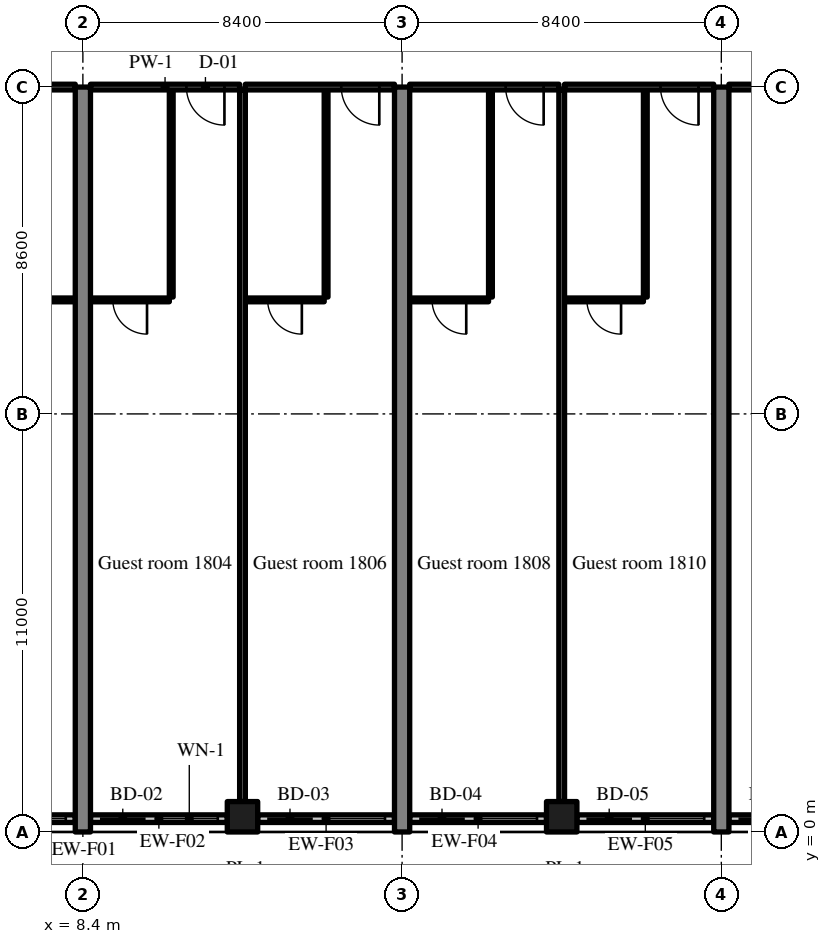
"""IFC4 building model, lengths in metres.
Left out: names, types, materials, properties, quantities, classifications, styles, units other than length and angle.
Written with IfcOpenShell. Run it as: python <this file> out.ifc"""

import sys

from ifc_helpers import new_model, si_unit, direction, frame, frame_2d, origin, origin_2d, place, context, subcontext, project, spatial, rectangle, extrude, source, transform, mapped, element, fill, save


model = new_model("IFC4")
c1 = context("Model", 3, precision=1e-05, world=origin(), true_north=direction((0.0, 1.0)))
c2 = subcontext(c1, "Body", "Model", "MODEL_VIEW")
j1 = project(units=[si_unit("LENGTHUNIT", "METRE"), si_unit("PLANEANGLEUNIT", "RADIAN")], contexts=[c1])
p1 = place(None, origin())
s1 = spatial("IfcSite", under=j1, at=p1, CompositionType="ELEMENT")
p2 = place(p1, origin())
s2 = spatial("IfcBuilding", under=s1, at=p2, CompositionType="ELEMENT")
p3 = place(p2, frame((0.0, 0.0, 77.2)))
s3 = spatial("IfcBuildingStorey", under=s2, at=p3, CompositionType="ELEMENT", Elevation=77.2)
m1 = source(origin(), c2, "Body", "SweptSolid", [
    extrude(rectangle(XDim=19.6, YDim=0.4, at=frame_2d((9.8, 0.0))), origin(), (0.0, 0.0, 1.0), 3.52),
])
for number, where, z_axis, x_axis in (
    (1, (8.4, 0.0, 0.0), (0.0, 0.0, 1.0), (0.0, 1.0, 0.0)),
    (2, (16.8, 0.0, 0.0), (0.0, 0.0, 1.0), (0.0, 1.0, 0.0)),
    (3, (25.2, 0.0, 0.0), (0.0, 0.0, 1.0), (0.0, 1.0, 0.0)),
):
    element("IfcWall", number, at=place(p3, frame(where, z_axis=z_axis, x_axis=x_axis)), inside=s3, PredefinedType="SHEAR", context=c2, shape_type="MappedRepresentation", body=[
        mapped(m1, transform((0.0, 0.0, 0.0), scale=1.0)),
    ])
m2 = source(origin(), c2, "Body", "SweptSolid", [
    extrude(rectangle(XDim=0.8, YDim=0.8, at=origin_2d()), origin(), (0.0, 0.0, 1.0), 3.52),
])
for number, where, z_axis, x_axis in (
    (4, (12.6, 0.4, 0.0), (0.0, 0.0, 1.0), (1.0, 0.0, 0.0)),
    (5, (21.0, 0.4, 0.0), (0.0, 0.0, 1.0), (1.0, 0.0, 0.0)),
):
    element("IfcColumn", number, at=place(p3, frame(where, z_axis=z_axis, x_axis=x_axis)), inside=s3, PredefinedType="COLUMN", context=c2, shape_type="MappedRepresentation", body=[
        mapped(m2, transform((0.0, 0.0, 0.0), scale=1.0)),
    ])
m3 = source(origin(), c2, "Body", "SweptSolid", [
    extrude(rectangle(XDim=4.055, YDim=0.2, at=frame_2d((2.027, 0.0))), origin(), (0.0, 0.0, 1.0), 2.82),
])
p4 = place(p3, frame((4.145, 0.35, 0.0), z_axis=(0.0, 0.0, 1.0), x_axis=(1.0, 0.0, 0.0)))
e6 = element("IfcWall", 6, at=p4, inside=s3, PredefinedType="SOLIDWALL", context=c2, shape_type="MappedRepresentation", body=[
    mapped(m3, transform((0.0, 0.0, 0.0), scale=1.0)),
])
m4 = source(origin(), c2, "Body", "SweptSolid", [
    extrude(rectangle(XDim=1.2, YDim=2.4, at=frame_2d((0.6, 1.2))), frame((0.0, 0.11, 0.0), z_axis=(0.0, -1.0, 0.0), x_axis=(1.0, 0.0, 0.0)), (0.0, 0.0, 1.0), 0.22),
])
p5 = place(p4, frame((0.25, 0.0, 0.0)))
e7 = element("IfcOpeningElement", 7, at=p5, cuts=e6, PredefinedType="OPENING", context=c2, shape_type="MappedRepresentation", body=[
    mapped(m4, transform((0.0, 0.0, 0.0), scale=1.0)),
])
m5 = source(origin(), c2, "Body", "SweptSolid", [
    extrude(rectangle(XDim=1.5, YDim=1.5, at=frame_2d((0.75, 0.75))), frame((0.0, 0.11, 0.0), z_axis=(0.0, -1.0, 0.0), x_axis=(1.0, 0.0, 0.0)), (0.0, 0.0, 1.0), 0.22),
])
p6 = place(p4, frame((2.305, 0.0, 0.9)))
e8 = element("IfcOpeningElement", 8, at=p6, cuts=e6, PredefinedType="OPENING", context=c2, shape_type="MappedRepresentation", body=[
    mapped(m5, transform((0.0, 0.0, 0.0), scale=1.0)),
])
m6 = source(origin(), c2, "Body", "SweptSolid", [
    extrude(rectangle(XDim=3.6, YDim=0.2, at=frame_2d((1.8, 0.0))), origin(), (0.0, 0.0, 1.0), 2.82),
])
p7 = place(p3, frame((8.6, 0.35, 0.0), z_axis=(0.0, 0.0, 1.0), x_axis=(1.0, 0.0, 0.0)))
e9 = element("IfcWall", 9, at=p7, inside=s3, PredefinedType="SOLIDWALL", context=c2, shape_type="MappedRepresentation", body=[
    mapped(m6, transform((0.0, 0.0, 0.0), scale=1.0)),
])
p8 = place(p7, frame((0.25, 0.0, 0.0)))
e10 = element("IfcOpeningElement", 10, at=p8, cuts=e9, PredefinedType="OPENING", context=c2, shape_type="MappedRepresentation", body=[
    mapped(m4, transform((0.0, 0.0, 0.0), scale=1.0)),
])
p9 = place(p7, frame((1.85, 0.0, 0.9)))
e11 = element("IfcOpeningElement", 11, at=p9, cuts=e9, PredefinedType="OPENING", context=c2, shape_type="MappedRepresentation", body=[
    mapped(m5, transform((0.0, 0.0, 0.0), scale=1.0)),
])
m7 = source(origin(), c2, "Body", "SweptSolid", [
    extrude(rectangle(XDim=3.6, YDim=0.2, at=frame_2d((1.8, 0.0))), origin(), (0.0, 0.0, 1.0), 2.82),
])
p10 = place(p3, frame((13.0, 0.35, 0.0), z_axis=(0.0, 0.0, 1.0), x_axis=(1.0, 0.0, 0.0)))
e12 = element("IfcWall", 12, at=p10, inside=s3, PredefinedType="SOLIDWALL", context=c2, shape_type="MappedRepresentation", body=[
    mapped(m7, transform((0.0, 0.0, 0.0), scale=1.0)),
])
p11 = place(p10, frame((0.25, 0.0, 0.0)))
e13 = element("IfcOpeningElement", 13, at=p11, cuts=e12, PredefinedType="OPENING", context=c2, shape_type="MappedRepresentation", body=[
    mapped(m4, transform((0.0, 0.0, 0.0), scale=1.0)),
])
p12 = place(p10, frame((1.85, 0.0, 0.9)))
e14 = element("IfcOpeningElement", 14, at=p12, cuts=e12, PredefinedType="OPENING", context=c2, shape_type="MappedRepresentation", body=[
    mapped(m5, transform((0.0, 0.0, 0.0), scale=1.0)),
])
p13 = place(p3, frame((17.0, 0.35, 0.0), z_axis=(0.0, 0.0, 1.0), x_axis=(1.0, 0.0, 0.0)))
e15 = element("IfcWall", 15, at=p13, inside=s3, PredefinedType="SOLIDWALL", context=c2, shape_type="MappedRepresentation", body=[
    mapped(m7, transform((0.0, 0.0, 0.0), scale=1.0)),
])
p14 = place(p13, frame((0.25, 0.0, 0.0)))
e16 = element("IfcOpeningElement", 16, at=p14, cuts=e15, PredefinedType="OPENING", context=c2, shape_type="MappedRepresentation", body=[
    mapped(m4, transform((0.0, 0.0, 0.0), scale=1.0)),
])
p15 = place(p13, frame((1.85, 0.0, 0.9)))
e17 = element("IfcOpeningElement", 17, at=p15, cuts=e15, PredefinedType="OPENING", context=c2, shape_type="MappedRepresentation", body=[
    mapped(m5, transform((0.0, 0.0, 0.0), scale=1.0)),
])
p16 = place(p3, frame((21.4, 0.35, 0.0), z_axis=(0.0, 0.0, 1.0), x_axis=(1.0, 0.0, 0.0)))
e18 = element("IfcWall", 18, at=p16, inside=s3, PredefinedType="SOLIDWALL", context=c2, shape_type="MappedRepresentation", body=[
    mapped(m7, transform((0.0, 0.0, 0.0), scale=1.0)),
])
p17 = place(p16, frame((0.25, 0.0, 0.0)))
e19 = element("IfcOpeningElement", 19, at=p17, cuts=e18, PredefinedType="OPENING", context=c2, shape_type="MappedRepresentation", body=[
    mapped(m4, transform((0.0, 0.0, 0.0), scale=1.0)),
])
p18 = place(p16, frame((1.85, 0.0, 0.9)))
e20 = element("IfcOpeningElement", 20, at=p18, cuts=e18, PredefinedType="OPENING", context=c2, shape_type="MappedRepresentation", body=[
    mapped(m5, transform((0.0, 0.0, 0.0), scale=1.0)),
])
p19 = place(p3, frame((25.4, 0.35, 0.0), z_axis=(0.0, 0.0, 1.0), x_axis=(1.0, 0.0, 0.0)))
e21 = element("IfcWall", 21, at=p19, inside=s3, PredefinedType="SOLIDWALL", context=c2, shape_type="MappedRepresentation", body=[
    mapped(m7, transform((0.0, 0.0, 0.0), scale=1.0)),
])
p20 = place(p19, frame((0.25, 0.0, 0.0)))
e22 = element("IfcOpeningElement", 22, at=p20, cuts=e21, PredefinedType="OPENING", context=c2, shape_type="MappedRepresentation", body=[
    mapped(m4, transform((0.0, 0.0, 0.0), scale=1.0)),
])
p21 = place(p19, frame((1.85, 0.0, 0.9)))
e23 = element("IfcOpeningElement", 23, at=p21, cuts=e21, PredefinedType="OPENING", context=c2, shape_type="MappedRepresentation", body=[
    mapped(m5, transform((0.0, 0.0, 0.0), scale=1.0)),
])
m8 = source(origin(), c2, "Body", "SweptSolid", [
    extrude(rectangle(XDim=2.35, YDim=0.1, at=frame_2d((1.175, 0.0))), origin(), (0.0, 0.0, 1.0), 3.52),
])
p22 = place(p3, frame((5.85, 14.0, 0.0), z_axis=(0.0, 0.0, 1.0), x_axis=(1.0, 0.0, 0.0)))
e24 = element("IfcWall", 24, at=p22, inside=s3, PredefinedType="PARTITIONING", context=c2, shape_type="MappedRepresentation", body=[
    mapped(m8, transform((0.0, 0.0, 0.0), scale=1.0)),
])
m9 = source(origin(), c2, "Body", "SweptSolid", [
    extrude(rectangle(XDim=0.9, YDim=2.1, at=frame_2d((0.45, 1.05))), frame((0.0, 0.06, 0.0), z_axis=(0.0, -1.0, 0.0), x_axis=(1.0, 0.0, 0.0)), (0.0, 0.0, 1.0), 0.12),
])
p23 = place(p22, frame((0.725, 0.0, 0.0)))
e25 = element("IfcOpeningElement", 25, at=p23, cuts=e24, PredefinedType="OPENING", context=c2, shape_type="MappedRepresentation", body=[
    mapped(m9, transform((0.0, 0.0, 0.0), scale=1.0)),
])
m10 = source(origin(), c2, "Body", "SweptSolid", [
    extrude(rectangle(XDim=7.8, YDim=0.15, at=frame_2d((3.9, 0.0))), origin(), (0.0, 0.0, 1.0), 2.82),
])
p24 = place(p3, frame((0.4, 19.6, 0.0), z_axis=(0.0, 0.0, 1.0), x_axis=(1.0, 0.0, 0.0)))
e26 = element("IfcWall", 26, at=p24, inside=s3, PredefinedType="PARTITIONING", context=c2, shape_type="MappedRepresentation", body=[
    mapped(m10, transform((0.0, 0.0, 0.0), scale=1.0)),
])
m11 = source(origin(), c2, "Body", "SweptSolid", [
    extrude(rectangle(XDim=1.0, YDim=2.1, at=frame_2d((0.5, 1.05))), frame((0.0, 0.085, 0.0), z_axis=(0.0, -1.0, 0.0), x_axis=(1.0, 0.0, 0.0)), (0.0, 0.0, 1.0), 0.17),
])
p25 = place(p24, frame((0.4, 0.0, 0.0)))
e27 = element("IfcOpeningElement", 27, at=p25, cuts=e26, PredefinedType="OPENING", context=c2, shape_type="MappedRepresentation", body=[
    mapped(m11, transform((0.0, 0.0, 0.0), scale=1.0)),
])
m12 = source(origin(), c2, "Body", "SweptSolid", [
    extrude(rectangle(XDim=5.45, YDim=0.1, at=frame_2d((2.725, 0.0))), origin(), (0.0, 0.0, 1.0), 3.52),
])
p26 = place(p3, frame((10.725, 14.075, 0.0), z_axis=(0.0, 0.0, 1.0), x_axis=(0.0, 1.0, 0.0)))
e28 = element("IfcWall", 28, at=p26, inside=s3, PredefinedType="PARTITIONING", context=c2, shape_type="MappedRepresentation", body=[
    mapped(m12, transform((0.0, 0.0, 0.0), scale=1.0)),
])
m13 = source(origin(), c2, "Body", "SweptSolid", [
    extrude(rectangle(XDim=2.075, YDim=0.1, at=frame_2d((1.038, 0.0))), origin(), (0.0, 0.0, 1.0), 3.52),
])
p27 = place(p3, frame((8.6, 14.0, 0.0), z_axis=(0.0, 0.0, 1.0), x_axis=(1.0, 0.0, 0.0)))
e29 = element("IfcWall", 29, at=p27, inside=s3, PredefinedType="PARTITIONING", context=c2, shape_type="MappedRepresentation", body=[
    mapped(m13, transform((0.0, 0.0, 0.0), scale=1.0)),
])
p28 = place(p27, frame((0.588, 0.0, 0.0)))
e30 = element("IfcOpeningElement", 30, at=p28, cuts=e29, PredefinedType="OPENING", context=c2, shape_type="MappedRepresentation", body=[
    mapped(m9, transform((0.0, 0.0, 0.0), scale=1.0)),
])
m14 = source(origin(), c2, "Body", "SweptSolid", [
    extrude(rectangle(XDim=3.925, YDim=0.15, at=frame_2d((1.962, 0.0))), origin(), (0.0, 0.0, 1.0), 2.82),
])
p29 = place(p3, frame((8.6, 19.6, 0.0), z_axis=(0.0, 0.0, 1.0), x_axis=(1.0, 0.0, 0.0)))
e31 = element("IfcWall", 31, at=p29, inside=s3, PredefinedType="PARTITIONING", context=c2, shape_type="MappedRepresentation", body=[
    mapped(m14, transform((0.0, 0.0, 0.0), scale=1.0)),
])
p30 = place(p29, frame((2.525, 0.0, 0.0)))
e32 = element("IfcOpeningElement", 32, at=p30, cuts=e31, PredefinedType="OPENING", context=c2, shape_type="MappedRepresentation", body=[
    mapped(m11, transform((0.0, 0.0, 0.0), scale=1.0)),
])
p31 = place(p3, frame((14.8, 14.075, 0.0), z_axis=(0.0, 0.0, 1.0), x_axis=(0.0, 1.0, 0.0)))
e33 = element("IfcWall", 33, at=p31, inside=s3, PredefinedType="PARTITIONING", context=c2, shape_type="MappedRepresentation", body=[
    mapped(m12, transform((0.0, 0.0, 0.0), scale=1.0)),
])
p32 = place(p3, frame((12.675, 14.0, 0.0), z_axis=(0.0, 0.0, 1.0), x_axis=(1.0, 0.0, 0.0)))
e34 = element("IfcWall", 34, at=p32, inside=s3, PredefinedType="PARTITIONING", context=c2, shape_type="MappedRepresentation", body=[
    mapped(m13, transform((0.0, 0.0, 0.0), scale=1.0)),
])
p33 = place(p32, frame((0.587, 0.0, 0.0)))
e35 = element("IfcOpeningElement", 35, at=p33, cuts=e34, PredefinedType="OPENING", context=c2, shape_type="MappedRepresentation", body=[
    mapped(m9, transform((0.0, 0.0, 0.0), scale=1.0)),
])
m15 = source(origin(), c2, "Body", "SweptSolid", [
    extrude(rectangle(XDim=3.925, YDim=0.15, at=frame_2d((1.962, 0.0))), origin(), (0.0, 0.0, 1.0), 2.82),
])
p34 = place(p3, frame((12.675, 19.6, 0.0), z_axis=(0.0, 0.0, 1.0), x_axis=(1.0, 0.0, 0.0)))
e36 = element("IfcWall", 36, at=p34, inside=s3, PredefinedType="PARTITIONING", context=c2, shape_type="MappedRepresentation", body=[
    mapped(m15, transform((0.0, 0.0, 0.0), scale=1.0)),
])
p35 = place(p34, frame((2.525, 0.0, 0.0)))
e37 = element("IfcOpeningElement", 37, at=p35, cuts=e36, PredefinedType="OPENING", context=c2, shape_type="MappedRepresentation", body=[
    mapped(m11, transform((0.0, 0.0, 0.0), scale=1.0)),
])
m16 = source(origin(), c2, "Body", "SweptSolid", [
    extrude(rectangle(XDim=18.725, YDim=0.15, at=frame_2d((9.362, 0.0))), origin(), (0.0, 0.0, 1.0), 3.52),
])
p36 = place(p3, frame((12.6, 0.8, 0.0), z_axis=(0.0, 0.0, 1.0), x_axis=(0.0, 1.0, 0.0)))
e38 = element("IfcWall", 38, at=p36, inside=s3, PredefinedType="PARTITIONING", context=c2, shape_type="MappedRepresentation", body=[
    mapped(m16, transform((0.0, 0.0, 0.0), scale=1.0)),
])
p37 = place(p3, frame((19.125, 14.075, 0.0), z_axis=(0.0, 0.0, 1.0), x_axis=(0.0, 1.0, 0.0)))
e39 = element("IfcWall", 39, at=p37, inside=s3, PredefinedType="PARTITIONING", context=c2, shape_type="MappedRepresentation", body=[
    mapped(m12, transform((0.0, 0.0, 0.0), scale=1.0)),
])
p38 = place(p3, frame((17.0, 14.0, 0.0), z_axis=(0.0, 0.0, 1.0), x_axis=(1.0, 0.0, 0.0)))
e40 = element("IfcWall", 40, at=p38, inside=s3, PredefinedType="PARTITIONING", context=c2, shape_type="MappedRepresentation", body=[
    mapped(m13, transform((0.0, 0.0, 0.0), scale=1.0)),
])
p39 = place(p38, frame((0.588, 0.0, 0.0)))
e41 = element("IfcOpeningElement", 41, at=p39, cuts=e40, PredefinedType="OPENING", context=c2, shape_type="MappedRepresentation", body=[
    mapped(m9, transform((0.0, 0.0, 0.0), scale=1.0)),
])
p40 = place(p3, frame((17.0, 19.6, 0.0), z_axis=(0.0, 0.0, 1.0), x_axis=(1.0, 0.0, 0.0)))
e42 = element("IfcWall", 42, at=p40, inside=s3, PredefinedType="PARTITIONING", context=c2, shape_type="MappedRepresentation", body=[
    mapped(m15, transform((0.0, 0.0, 0.0), scale=1.0)),
])
p41 = place(p40, frame((2.525, 0.0, 0.0)))
e43 = element("IfcOpeningElement", 43, at=p41, cuts=e42, PredefinedType="OPENING", context=c2, shape_type="MappedRepresentation", body=[
    mapped(m11, transform((0.0, 0.0, 0.0), scale=1.0)),
])
p42 = place(p3, frame((23.2, 14.075, 0.0), z_axis=(0.0, 0.0, 1.0), x_axis=(0.0, 1.0, 0.0)))
e44 = element("IfcWall", 44, at=p42, inside=s3, PredefinedType="PARTITIONING", context=c2, shape_type="MappedRepresentation", body=[
    mapped(m12, transform((0.0, 0.0, 0.0), scale=1.0)),
])
p43 = place(p3, frame((21.075, 14.0, 0.0), z_axis=(0.0, 0.0, 1.0), x_axis=(1.0, 0.0, 0.0)))
e45 = element("IfcWall", 45, at=p43, inside=s3, PredefinedType="PARTITIONING", context=c2, shape_type="MappedRepresentation", body=[
    mapped(m13, transform((0.0, 0.0, 0.0), scale=1.0)),
])
p44 = place(p43, frame((0.587, 0.0, 0.0)))
e46 = element("IfcOpeningElement", 46, at=p44, cuts=e45, PredefinedType="OPENING", context=c2, shape_type="MappedRepresentation", body=[
    mapped(m9, transform((0.0, 0.0, 0.0), scale=1.0)),
])
p45 = place(p3, frame((21.075, 19.6, 0.0), z_axis=(0.0, 0.0, 1.0), x_axis=(1.0, 0.0, 0.0)))
e47 = element("IfcWall", 47, at=p45, inside=s3, PredefinedType="PARTITIONING", context=c2, shape_type="MappedRepresentation", body=[
    mapped(m15, transform((0.0, 0.0, 0.0), scale=1.0)),
])
p46 = place(p45, frame((2.525, 0.0, 0.0)))
e48 = element("IfcOpeningElement", 48, at=p46, cuts=e47, PredefinedType="OPENING", context=c2, shape_type="MappedRepresentation", body=[
    mapped(m11, transform((0.0, 0.0, 0.0), scale=1.0)),
])
p47 = place(p3, frame((21.0, 0.8, 0.0), z_axis=(0.0, 0.0, 1.0), x_axis=(0.0, 1.0, 0.0)))
e49 = element("IfcWall", 49, at=p47, inside=s3, PredefinedType="PARTITIONING", context=c2, shape_type="MappedRepresentation", body=[
    mapped(m16, transform((0.0, 0.0, 0.0), scale=1.0)),
])
p48 = place(p3, frame((25.4, 19.6, 0.0), z_axis=(0.0, 0.0, 1.0), x_axis=(1.0, 0.0, 0.0)))
e50 = element("IfcWall", 50, at=p48, inside=s3, PredefinedType="PARTITIONING", context=c2, shape_type="MappedRepresentation", body=[
    mapped(m15, transform((0.0, 0.0, 0.0), scale=1.0)),
])
p49 = place(p48, frame((1.462, 0.0, 0.0)))
e51 = element("IfcOpeningElement", 51, at=p49, cuts=e50, PredefinedType="OPENING", context=c2, shape_type="MappedRepresentation", body=[
    mapped(m11, transform((0.0, 0.0, 0.0), scale=1.0)),
])
m17 = source(origin(), c2, "Body", "SweptSolid", [
    extrude(rectangle(XDim=1.5, YDim=1.5, at=frame_2d((0.75, 0.75))), frame((0.0, 0.03, 0.0), z_axis=(0.0, -1.0, 0.0), x_axis=(1.0, 0.0, 0.0)), (0.0, 0.0, 1.0), 0.06),
])
p50 = place(p6, origin())
e52 = element("IfcWindow", 52, at=p50, inside=s3, PartitioningType="SINGLE_PANEL", PredefinedType="WINDOW", context=c2, shape_type="MappedRepresentation", body=[
    mapped(m17, transform((0.0, 0.0, 0.0), scale=1.0)),
])
fill(e8, e52)
m18 = source(origin(), c2, "Body", "SweptSolid", [
    extrude(rectangle(XDim=1.2, YDim=2.4, at=frame_2d((0.6, 1.2))), frame((0.0, 0.025, 0.0), z_axis=(0.0, -1.0, 0.0), x_axis=(1.0, 0.0, 0.0)), (0.0, 0.0, 1.0), 0.05),
])
p51 = place(p8, origin())
e53 = element("IfcDoor", 53, at=p51, inside=s3, OperationType="SLIDING_TO_RIGHT", PredefinedType="DOOR", context=c2, shape_type="MappedRepresentation", body=[
    mapped(m18, transform((0.0, 0.0, 0.0), scale=1.0)),
])
fill(e10, e53)
p52 = place(p9, origin())
e54 = element("IfcWindow", 54, at=p52, inside=s3, PartitioningType="SINGLE_PANEL", PredefinedType="WINDOW", context=c2, shape_type="MappedRepresentation", body=[
    mapped(m17, transform((0.0, 0.0, 0.0), scale=1.0)),
])
fill(e11, e54)
p53 = place(p11, origin())
e55 = element("IfcDoor", 55, at=p53, inside=s3, OperationType="SLIDING_TO_LEFT", PredefinedType="DOOR", context=c2, shape_type="MappedRepresentation", body=[
    mapped(m18, transform((0.0, 0.0, 0.0), scale=1.0)),
])
fill(e13, e55)
p54 = place(p12, origin())
e56 = element("IfcWindow", 56, at=p54, inside=s3, PartitioningType="SINGLE_PANEL", PredefinedType="WINDOW", context=c2, shape_type="MappedRepresentation", body=[
    mapped(m17, transform((0.0, 0.0, 0.0), scale=1.0)),
])
fill(e14, e56)
p55 = place(p14, origin())
e57 = element("IfcDoor", 57, at=p55, inside=s3, OperationType="SLIDING_TO_RIGHT", PredefinedType="DOOR", context=c2, shape_type="MappedRepresentation", body=[
    mapped(m18, transform((0.0, 0.0, 0.0), scale=1.0)),
])
fill(e16, e57)
p56 = place(p15, origin())
e58 = element("IfcWindow", 58, at=p56, inside=s3, PartitioningType="SINGLE_PANEL", PredefinedType="WINDOW", context=c2, shape_type="MappedRepresentation", body=[
    mapped(m17, transform((0.0, 0.0, 0.0), scale=1.0)),
])
fill(e17, e58)
p57 = place(p17, origin())
e59 = element("IfcDoor", 59, at=p57, inside=s3, OperationType="SLIDING_TO_LEFT", PredefinedType="DOOR", context=c2, shape_type="MappedRepresentation", body=[
    mapped(m18, transform((0.0, 0.0, 0.0), scale=1.0)),
])
fill(e19, e59)
p58 = place(p18, origin())
e60 = element("IfcWindow", 60, at=p58, inside=s3, PartitioningType="SINGLE_PANEL", PredefinedType="WINDOW", context=c2, shape_type="MappedRepresentation", body=[
    mapped(m17, transform((0.0, 0.0, 0.0), scale=1.0)),
])
fill(e20, e60)
p59 = place(p20, origin())
e61 = element("IfcDoor", 61, at=p59, inside=s3, OperationType="SLIDING_TO_RIGHT", PredefinedType="DOOR", context=c2, shape_type="MappedRepresentation", body=[
    mapped(m18, transform((0.0, 0.0, 0.0), scale=1.0)),
])
fill(e22, e61)
m19 = source(origin(), c2, "Body", "SweptSolid", [
    extrude(rectangle(XDim=0.9, YDim=2.1, at=frame_2d((0.45, 1.05))), frame((0.0, 0.025, 0.0), z_axis=(0.0, -1.0, 0.0), x_axis=(1.0, 0.0, 0.0)), (0.0, 0.0, 1.0), 0.05),
])
p60 = place(p28, origin())
e62 = element("IfcDoor", 62, at=p60, inside=s3, OperationType="SINGLE_SWING_RIGHT", PredefinedType="DOOR", context=c2, shape_type="MappedRepresentation", body=[
    mapped(m19, transform((0.0, 0.0, 0.0), scale=1.0)),
])
fill(e30, e62)
m20 = source(origin(), c2, "Body", "SweptSolid", [
    extrude(rectangle(XDim=1.0, YDim=2.1, at=frame_2d((0.5, 1.05))), frame((0.0, 0.025, 0.0), z_axis=(0.0, -1.0, 0.0), x_axis=(1.0, 0.0, 0.0)), (0.0, 0.0, 1.0), 0.05),
])
p61 = place(p30, origin())
e63 = element("IfcDoor", 63, at=p61, inside=s3, OperationType="SINGLE_SWING_RIGHT", PredefinedType="DOOR", context=c2, shape_type="MappedRepresentation", body=[
    mapped(m20, transform((0.0, 0.0, 0.0), scale=1.0)),
])
fill(e32, e63)
p62 = place(p33, origin())
e64 = element("IfcDoor", 64, at=p62, inside=s3, OperationType="SINGLE_SWING_RIGHT", PredefinedType="DOOR", context=c2, shape_type="MappedRepresentation", body=[
    mapped(m19, transform((0.0, 0.0, 0.0), scale=1.0)),
])
fill(e35, e64)
p63 = place(p35, origin())
e65 = element("IfcDoor", 65, at=p63, inside=s3, OperationType="SINGLE_SWING_RIGHT", PredefinedType="DOOR", context=c2, shape_type="MappedRepresentation", body=[
    mapped(m20, transform((0.0, 0.0, 0.0), scale=1.0)),
])
fill(e37, e65)
p64 = place(p39, origin())
e66 = element("IfcDoor", 66, at=p64, inside=s3, OperationType="SINGLE_SWING_RIGHT", PredefinedType="DOOR", context=c2, shape_type="MappedRepresentation", body=[
    mapped(m19, transform((0.0, 0.0, 0.0), scale=1.0)),
])
fill(e41, e66)
p65 = place(p41, origin())
e67 = element("IfcDoor", 67, at=p65, inside=s3, OperationType="SINGLE_SWING_RIGHT", PredefinedType="DOOR", context=c2, shape_type="MappedRepresentation", body=[
    mapped(m20, transform((0.0, 0.0, 0.0), scale=1.0)),
])
fill(e43, e67)
p66 = place(p44, origin())
e68 = element("IfcDoor", 68, at=p66, inside=s3, OperationType="SINGLE_SWING_RIGHT", PredefinedType="DOOR", context=c2, shape_type="MappedRepresentation", body=[
    mapped(m19, transform((0.0, 0.0, 0.0), scale=1.0)),
])
fill(e46, e68)
p67 = place(p46, origin())
e69 = element("IfcDoor", 69, at=p67, inside=s3, OperationType="SINGLE_SWING_RIGHT", PredefinedType="DOOR", context=c2, shape_type="MappedRepresentation", body=[
    mapped(m20, transform((0.0, 0.0, 0.0), scale=1.0)),
])
fill(e48, e69)
save(model, sys.argv[1])
